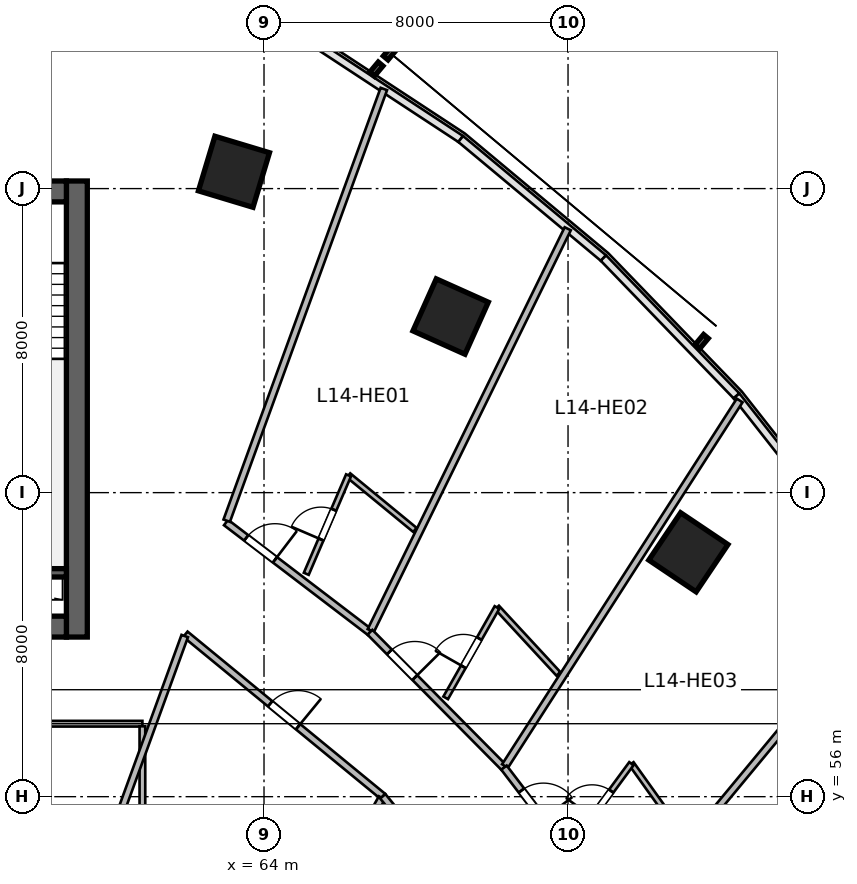
"""IFC4 building model, lengths in metres.
Left out: names, types, materials, properties, quantities, classifications, styles, units other than length and angle.
Written with IfcOpenShell. Run it as: python <this file> out.ifc"""

import sys

from ifc_helpers import new_model, si_unit, direction, frame, frame_2d, origin, origin_2d, place, context, subcontext, project, spatial, rectangle, extrude, source, transform, mapped, element, fill, save


model = new_model("IFC4")
c1 = context("Model", 3, precision=1e-05, world=origin(), true_north=direction((0.0, 1.0)))
c2 = subcontext(c1, "Body", "Model", "MODEL_VIEW")
j1 = project(units=[si_unit("LENGTHUNIT", "METRE"), si_unit("PLANEANGLEUNIT", "RADIAN")], contexts=[c1])
p1 = place(None, origin())
s1 = spatial("IfcSite", under=j1, at=p1, CompositionType="ELEMENT")
p2 = place(p1, origin())
s2 = spatial("IfcBuilding", under=s1, at=p2, CompositionType="ELEMENT")
p3 = place(p2, frame((0.0, 0.0, 64.2)))
s3 = spatial("IfcBuildingStorey", under=s2, at=p3, CompositionType="ELEMENT", Elevation=64.2)
m1 = source(origin(), c2, "Body", "SweptSolid", [
    extrude(rectangle(XDim=12.0, YDim=0.55, at=frame_2d((6.0, 0.0))), origin(), (0.0, 0.0, 1.0), 3.6),
])
p4 = place(p3, frame((59.075, 60.2, 0.0), z_axis=(0.0, 0.0, 1.0), x_axis=(0.0, 1.0, 0.0)))
e1 = element("IfcWall", 1, at=p4, inside=s3, PredefinedType="SHEAR", context=c2, shape_type="MappedRepresentation", body=[
    mapped(m1, transform((0.0, 0.0, 0.0), scale=1.0)),
])
m2 = source(origin(), c2, "Body", "SweptSolid", [
    extrude(rectangle(XDim=21.6, YDim=0.55, at=frame_2d((10.8, 0.0))), origin(), (0.0, 0.0, 1.0), 3.6),
])
p5 = place(p3, frame((37.2, 60.475, 0.0), z_axis=(0.0, 0.0, 1.0), x_axis=(1.0, 0.0, 0.0)))
e2 = element("IfcWall", 2, at=p5, inside=s3, PredefinedType="SHEAR", context=c2, shape_type="MappedRepresentation", body=[
    mapped(m2, transform((0.0, 0.0, 0.0), scale=1.0)),
])
p6 = place(p5, frame((1.1, 0.0, 0.0)))
e3 = element("IfcOpeningElement", 3, at=p6, cuts=e2, PredefinedType="OPENING", context=c2, shape_type="SweptSolid", body=[
    extrude(rectangle(XDim=1.15, YDim=2.15, at=frame_2d((0.575, 1.075))), frame((0.0, 0.285, 0.0), z_axis=(0.0, -1.0, 0.0), x_axis=(1.0, 0.0, 0.0)), (0.0, 0.0, 1.0), 0.57),
])
p7 = place(p5, frame((19.5, 0.0, 0.0)))
e4 = element("IfcOpeningElement", 4, at=p7, cuts=e2, PredefinedType="OPENING", context=c2, shape_type="SweptSolid", body=[
    extrude(rectangle(XDim=0.9, YDim=2.1, at=frame_2d((0.45, 1.05))), frame((0.0, 0.285, 0.0), z_axis=(0.0, -1.0, 0.0), x_axis=(1.0, 0.0, 0.0)), (0.0, 0.0, 1.0), 0.57),
])
p8 = place(p5, frame((12.02, 0.0, 0.0)))
e5 = element("IfcOpeningElement", 5, at=p8, cuts=e2, PredefinedType="OPENING", context=c2, shape_type="SweptSolid", body=[
    extrude(rectangle(XDim=1.6, YDim=2.15, at=frame_2d((0.8, 1.075))), frame((0.0, 0.285, 0.0), z_axis=(0.0, -1.0, 0.0), x_axis=(1.0, 0.0, 0.0)), (0.0, 0.0, 1.0), 0.57),
])
p9 = place(p3, frame((37.2, 71.925, 0.0), z_axis=(0.0, 0.0, 1.0), x_axis=(1.0, 0.0, 0.0)))
e6 = element("IfcWall", 6, at=p9, inside=s3, PredefinedType="SHEAR", context=c2, shape_type="MappedRepresentation", body=[
    mapped(m2, transform((0.0, 0.0, 0.0), scale=1.0)),
])
p10 = place(p9, frame((1.2, 0.0, 0.0)))
e7 = element("IfcOpeningElement", 7, at=p10, cuts=e6, PredefinedType="OPENING", context=c2, shape_type="SweptSolid", body=[
    extrude(rectangle(XDim=0.9, YDim=2.1, at=frame_2d((0.45, 1.05))), frame((0.0, 0.285, 0.0), z_axis=(0.0, -1.0, 0.0), x_axis=(1.0, 0.0, 0.0)), (0.0, 0.0, 1.0), 0.57),
])
p11 = place(p9, frame((14.7, 0.0, 0.0)))
e8 = element("IfcOpeningElement", 8, at=p11, cuts=e6, PredefinedType="OPENING", context=c2, shape_type="SweptSolid", body=[
    extrude(rectangle(XDim=1.2, YDim=2.15, at=frame_2d((0.6, 1.075))), frame((0.0, 0.285, 0.0), z_axis=(0.0, -1.0, 0.0), x_axis=(1.0, 0.0, 0.0)), (0.0, 0.0, 1.0), 0.57),
])
p12 = place(p9, frame((4.15, 0.0, 0.0)))
e9 = element("IfcOpeningElement", 9, at=p12, cuts=e6, PredefinedType="OPENING", context=c2, shape_type="SweptSolid", body=[
    extrude(rectangle(XDim=1.3, YDim=2.15, at=frame_2d((0.65, 1.075))), frame((0.0, 0.285, 0.0), z_axis=(0.0, -1.0, 0.0), x_axis=(1.0, 0.0, 0.0)), (0.0, 0.0, 1.0), 0.57),
])
p13 = place(p9, frame((7.1, 0.0, 0.0)))
e10 = element("IfcOpeningElement", 10, at=p13, cuts=e6, PredefinedType="OPENING", context=c2, shape_type="SweptSolid", body=[
    extrude(rectangle(XDim=0.9, YDim=2.1, at=frame_2d((0.45, 1.05))), frame((0.0, 0.285, 0.0), z_axis=(0.0, -1.0, 0.0), x_axis=(1.0, 0.0, 0.0)), (0.0, 0.0, 1.0), 0.57),
])
m3 = source(origin(), c2, "Body", "SweptSolid", [
    extrude(rectangle(XDim=3.27, YDim=0.22, at=frame_2d((1.635, 0.0))), origin(), (0.0, 0.0, 1.0), 3.6),
])
p14 = place(p3, frame((55.53, 61.89, 0.0), z_axis=(0.0, 0.0, 1.0), x_axis=(1.0, 0.0, 0.0)))
e11 = element("IfcWall", 11, at=p14, inside=s3, PredefinedType="SHEAR", context=c2, shape_type="MappedRepresentation", body=[
    mapped(m3, transform((0.0, 0.0, 0.0), scale=1.0)),
])
m4 = source(origin(), c2, "Body", "SweptSolid", [
    extrude(rectangle(XDim=1.5, YDim=1.5, at=origin_2d()), origin(), (0.0, 0.0, 1.0), 3.6),
])
for number, where, z_axis, x_axis in (
    (12, (63.209, 72.442, 0.0), (0.0, 0.0, 1.0), (0.289, 0.957, 0.0)),
    (13, (68.91, 68.633, 0.0), (0.0, 0.0, 1.0), (0.409, 0.912, 0.0)),
    (14, (75.167, 62.43, 0.0), (0.0, 0.0, 1.0), (0.558, 0.83, 0.0)),
):
    element("IfcColumn", number, at=place(p3, frame(where, z_axis=z_axis, x_axis=x_axis)), inside=s3, PredefinedType="COLUMN", context=c2, shape_type="MappedRepresentation", body=[
        mapped(m4, transform((0.0, 0.0, 0.0), scale=1.0)),
    ])
m5 = source(origin(), c2, "Body", "SweptSolid", [
    extrude(rectangle(XDim=6.6, YDim=0.15, at=frame_2d((3.3, 0.0))), origin(), (0.0, 0.0, 1.0), 3.36),
])
p15 = place(p3, frame((54.2, 57.92, 0.0), z_axis=(0.0, 0.0, 1.0), x_axis=(1.0, 0.0, 0.0)))
e15 = element("IfcWall", 15, at=p15, inside=s3, PredefinedType="PARTITIONING", context=c2, shape_type="MappedRepresentation", body=[
    mapped(m5, transform((0.0, 0.0, 0.0), scale=1.0)),
])
p16 = place(p15, frame((2.825, 0.0, 0.0)))
e16 = element("IfcOpeningElement", 16, at=p16, cuts=e15, PredefinedType="OPENING", context=c2, shape_type="SweptSolid", body=[
    extrude(rectangle(XDim=0.95, YDim=2.1, at=frame_2d((0.475, 1.05))), frame((0.0, 0.085, 0.0), z_axis=(0.0, -1.0, 0.0), x_axis=(1.0, 0.0, 0.0)), (0.0, 0.0, 1.0), 0.17),
])
m6 = source(origin(), c2, "Body", "SweptSolid", [
    extrude(rectangle(XDim=3.785, YDim=0.15, at=frame_2d((1.893, 0.0))), origin(), (0.0, 0.0, 1.0), 3.36),
])
p17 = place(p3, frame((60.8, 54.067, 0.0), z_axis=(0.0, 0.0, 1.0), x_axis=(0.0, 1.0, 0.0)))
e17 = element("IfcWall", 17, at=p17, inside=s3, PredefinedType="PARTITIONING", context=c2, shape_type="MappedRepresentation", body=[
    mapped(m6, transform((0.0, 0.0, 0.0), scale=1.0)),
])
m7 = source(origin(), c2, "Body", "SweptSolid", [
    extrude(rectangle(XDim=4.762, YDim=0.18, at=frame_2d((2.381, 0.0))), origin(), (0.0, 0.0, 1.0), 3.36),
])
p18 = place(p3, frame((63.001, 63.214, 0.0), z_axis=(0.0, 0.0, 1.0), x_axis=(0.795070295872, -0.60651729128, 0.0)))
e18 = element("IfcWall", 18, at=p18, inside=s3, PredefinedType="PLUMBINGWALL", context=c2, shape_type="MappedRepresentation", body=[
    mapped(m7, transform((0.0, 0.0, 0.0), scale=1.0)),
])
p19 = place(p18, frame((0.668, 0.0, 0.0)))
e19 = element("IfcOpeningElement", 19, at=p19, cuts=e18, PredefinedType="OPENING", context=c2, shape_type="SweptSolid", body=[
    extrude(rectangle(XDim=0.95, YDim=2.15, at=frame_2d((0.475, 1.075))), frame((0.0, 0.1, 0.0), z_axis=(0.0, -1.0, 0.0), x_axis=(1.0, 0.0, 0.0)), (0.0, 0.0, 1.0), 0.2),
])
m8 = source(origin(), c2, "Body", "SweptSolid", [
    extrude(rectangle(XDim=12.088, YDim=0.18, at=frame_2d((6.044, 0.0))), origin(), (0.0, 0.0, 1.0), 3.36),
])
p20 = place(p3, frame((63.019, 63.262, 0.0), z_axis=(0.0, 0.0, 1.0), x_axis=(0.34203007529, 0.939689005787, 0.0)))
e20 = element("IfcWall", 20, at=p20, inside=s3, PredefinedType="PLUMBINGWALL", context=c2, shape_type="MappedRepresentation", body=[
    mapped(m8, transform((0.0, 0.0, 0.0), scale=1.0)),
])
m9 = source(origin(), c2, "Body", "SweptSolid", [
    extrude(rectangle(XDim=11.775, YDim=0.18, at=frame_2d((5.887, 0.0))), origin(), (0.0, 0.0, 1.0), 3.36),
])
p21 = place(p3, frame((66.81, 60.371, 0.0), z_axis=(0.0, 0.0, 1.0), x_axis=(0.4401500056, 0.897924257702, 0.0)))
e21 = element("IfcWall", 21, at=p21, inside=s3, PredefinedType="PLUMBINGWALL", context=c2, shape_type="MappedRepresentation", body=[
    mapped(m9, transform((0.0, 0.0, 0.0), scale=1.0)),
])
m10 = source(origin(), c2, "Body", "SweptSolid", [
    extrude(rectangle(XDim=2.26, YDim=0.14, at=frame_2d((1.13, 0.0))), origin(), (0.0, 0.0, 1.0), 3.36),
])
p22 = place(p3, frame((66.224, 64.455, 0.0), z_axis=(0.0, 0.0, 1.0), x_axis=(0.772646789219, -0.634836151388, 0.0)))
e22 = element("IfcWall", 22, at=p22, inside=s3, PredefinedType="PARTITIONING", context=c2, shape_type="MappedRepresentation", body=[
    mapped(m10, transform((0.0, 0.0, 0.0), scale=1.0)),
])
m11 = source(origin(), c2, "Body", "SweptSolid", [
    extrude(rectangle(XDim=2.819, YDim=0.14, at=frame_2d((1.409, 0.0))), origin(), (0.0, 0.0, 1.0), 3.36),
])
p23 = place(p3, frame((65.112, 61.864, 0.0), z_axis=(0.0, 0.0, 1.0), x_axis=(0.394420979357, 0.918929861874, 0.0)))
e23 = element("IfcWall", 23, at=p23, inside=s3, PredefinedType="PARTITIONING", context=c2, shape_type="MappedRepresentation", body=[
    mapped(m11, transform((0.0, 0.0, 0.0), scale=1.0)),
])
p24 = place(p23, frame((0.984, 0.0, 0.0)))
e24 = element("IfcOpeningElement", 24, at=p24, cuts=e23, PredefinedType="OPENING", context=c2, shape_type="SweptSolid", body=[
    extrude(rectangle(XDim=0.85, YDim=2.05, at=frame_2d((0.425, 1.025))), frame((0.0, 0.08, 0.0), z_axis=(0.0, -1.0, 0.0), x_axis=(1.0, 0.0, 0.0)), (0.0, 0.0, 1.0), 0.16),
])
m12 = source(origin(), c2, "Body", "SweptSolid", [
    extrude(rectangle(XDim=5.012, YDim=0.18, at=frame_2d((2.506, 0.0))), origin(), (0.0, 0.0, 1.0), 3.36),
])
p25 = place(p3, frame((66.788, 60.326, 0.0), z_axis=(0.0, 0.0, 1.0), x_axis=(0.703664626435, -0.710532260707, 0.0)))
e25 = element("IfcWall", 25, at=p25, inside=s3, PredefinedType="PLUMBINGWALL", context=c2, shape_type="MappedRepresentation", body=[
    mapped(m12, transform((0.0, 0.0, 0.0), scale=1.0)),
])
p26 = place(p25, frame((0.728, 0.0, 0.0)))
e26 = element("IfcOpeningElement", 26, at=p26, cuts=e25, PredefinedType="OPENING", context=c2, shape_type="SweptSolid", body=[
    extrude(rectangle(XDim=0.95, YDim=2.15, at=frame_2d((0.475, 1.075))), frame((0.0, 0.1, 0.0), z_axis=(0.0, -1.0, 0.0), x_axis=(1.0, 0.0, 0.0)), (0.0, 0.0, 1.0), 0.2),
])
m13 = source(origin(), c2, "Body", "SweptSolid", [
    extrude(rectangle(XDim=11.432, YDim=0.18, at=frame_2d((5.716, 0.0))), origin(), (0.0, 0.0, 1.0), 3.36),
])
p27 = place(p3, frame((70.341, 56.805, 0.0), z_axis=(0.0, 0.0, 1.0), x_axis=(0.540196183124, 0.841539115988, 0.0)))
e27 = element("IfcWall", 27, at=p27, inside=s3, PredefinedType="PLUMBINGWALL", context=c2, shape_type="MappedRepresentation", body=[
    mapped(m13, transform((0.0, 0.0, 0.0), scale=1.0)),
])
m14 = source(origin(), c2, "Body", "SweptSolid", [
    extrude(rectangle(XDim=2.38, YDim=0.14, at=frame_2d((1.19, 0.0))), origin(), (0.0, 0.0, 1.0), 3.36),
])
p28 = place(p3, frame((70.131, 60.979, 0.0), z_axis=(0.0, 0.0, 1.0), x_axis=(0.679084816758, -0.734059814762, 0.0)))
e28 = element("IfcWall", 28, at=p28, inside=s3, PredefinedType="PARTITIONING", context=c2, shape_type="MappedRepresentation", body=[
    mapped(m14, transform((0.0, 0.0, 0.0), scale=1.0)),
])
m15 = source(origin(), c2, "Body", "SweptSolid", [
    extrude(rectangle(XDim=2.735, YDim=0.14, at=frame_2d((1.367, 0.0))), origin(), (0.0, 0.0, 1.0), 3.36),
])
p29 = place(p3, frame((68.781, 58.6, 0.0), z_axis=(0.0, 0.0, 1.0), x_axis=(0.493694940578, 0.869635156631, 0.0)))
e29 = element("IfcWall", 29, at=p29, inside=s3, PredefinedType="PARTITIONING", context=c2, shape_type="MappedRepresentation", body=[
    mapped(m15, transform((0.0, 0.0, 0.0), scale=1.0)),
])
p30 = place(p29, frame((0.942, 0.0, 0.0)))
e30 = element("IfcOpeningElement", 30, at=p30, cuts=e29, PredefinedType="OPENING", context=c2, shape_type="SweptSolid", body=[
    extrude(rectangle(XDim=0.85, YDim=2.05, at=frame_2d((0.425, 1.025))), frame((0.0, 0.08, 0.0), z_axis=(0.0, -1.0, 0.0), x_axis=(1.0, 0.0, 0.0)), (0.0, 0.0, 1.0), 0.16),
])
m16 = source(origin(), c2, "Body", "SweptSolid", [
    extrude(rectangle(XDim=5.135, YDim=0.18, at=frame_2d((2.567, 0.0))), origin(), (0.0, 0.0, 1.0), 3.36),
])
p31 = place(p3, frame((70.315, 56.764, 0.0), z_axis=(0.0, 0.0, 1.0), x_axis=(0.606802199649, -0.794852873494, 0.0)))
e31 = element("IfcWall", 31, at=p31, inside=s3, PredefinedType="PLUMBINGWALL", context=c2, shape_type="MappedRepresentation", body=[
    mapped(m16, transform((0.0, 0.0, 0.0), scale=1.0)),
])
p32 = place(p31, frame((0.757, 0.0, 0.0)))
e32 = element("IfcOpeningElement", 32, at=p32, cuts=e31, PredefinedType="OPENING", context=c2, shape_type="SweptSolid", body=[
    extrude(rectangle(XDim=0.95, YDim=2.15, at=frame_2d((0.475, 1.075))), frame((0.0, 0.1, 0.0), z_axis=(0.0, -1.0, 0.0), x_axis=(1.0, 0.0, 0.0)), (0.0, 0.0, 1.0), 0.2),
])
m17 = source(origin(), c2, "Body", "SweptSolid", [
    extrude(rectangle(XDim=10.975, YDim=0.18, at=frame_2d((5.487, 0.0))), origin(), (0.0, 0.0, 1.0), 3.36),
])
p33 = place(p3, frame((73.46, 52.719, 0.0), z_axis=(0.0, 0.0, 1.0), x_axis=(0.638125265812, 0.769932558821, 0.0)))
e33 = element("IfcWall", 33, at=p33, inside=s3, PredefinedType="PLUMBINGWALL", context=c2, shape_type="MappedRepresentation", body=[
    mapped(m17, transform((0.0, 0.0, 0.0), scale=1.0)),
])
m18 = source(origin(), c2, "Body", "SweptSolid", [
    extrude(rectangle(XDim=2.437, YDim=0.14, at=frame_2d((1.218, 0.0))), origin(), (0.0, 0.0, 1.0), 3.36),
])
p34 = place(p3, frame((73.667, 56.868, 0.0), z_axis=(0.0, 0.0, 1.0), x_axis=(0.581797219134, -0.813333877204, 0.0)))
e34 = element("IfcWall", 34, at=p34, inside=s3, PredefinedType="PARTITIONING", context=c2, shape_type="MappedRepresentation", body=[
    mapped(m18, transform((0.0, 0.0, 0.0), scale=1.0)),
])
m19 = source(origin(), c2, "Body", "SweptSolid", [
    extrude(rectangle(XDim=2.642, YDim=0.14, at=frame_2d((1.321, 0.0))), origin(), (0.0, 0.0, 1.0), 3.36),
])
p35 = place(p3, frame((72.101, 54.741, 0.0), z_axis=(0.0, 0.0, 1.0), x_axis=(0.592789122423, 0.805357719487, 0.0)))
e35 = element("IfcWall", 35, at=p35, inside=s3, PredefinedType="PARTITIONING", context=c2, shape_type="MappedRepresentation", body=[
    mapped(m19, transform((0.0, 0.0, 0.0), scale=1.0)),
])
p36 = place(p35, frame((0.896, 0.0, 0.0)))
e36 = element("IfcOpeningElement", 36, at=p36, cuts=e35, PredefinedType="OPENING", context=c2, shape_type="SweptSolid", body=[
    extrude(rectangle(XDim=0.85, YDim=2.05, at=frame_2d((0.425, 1.025))), frame((0.0, 0.08, 0.0), z_axis=(0.0, -1.0, 0.0), x_axis=(1.0, 0.0, 0.0)), (0.0, 0.0, 1.0), 0.16),
])
m20 = source(origin(), c2, "Body", "SweptSolid", [
    extrude(rectangle(XDim=6.721, YDim=0.18, at=frame_2d((3.361, 0.0))), origin(), (0.0, 0.0, 1.0), 3.36),
])
p37 = place(p3, frame((61.931, 60.275, 0.0), z_axis=(0.0, 0.0, 1.0), x_axis=(0.772828051199, -0.63461547671, 0.0)))
e37 = element("IfcWall", 37, at=p37, inside=s3, PredefinedType="PLUMBINGWALL", context=c2, shape_type="MappedRepresentation", body=[
    mapped(m20, transform((0.0, 0.0, 0.0), scale=1.0)),
])
p38 = place(p37, frame((2.885, 0.0, 0.0)))
e38 = element("IfcOpeningElement", 38, at=p38, cuts=e37, PredefinedType="OPENING", context=c2, shape_type="SweptSolid", body=[
    extrude(rectangle(XDim=0.95, YDim=2.15, at=frame_2d((0.475, 1.075))), frame((0.0, 0.1, 0.0), z_axis=(0.0, -1.0, 0.0), x_axis=(1.0, 0.0, 0.0)), (0.0, 0.0, 1.0), 0.2),
])
m21 = source(origin(), c2, "Body", "SweptSolid", [
    extrude(rectangle(XDim=12.196, YDim=0.18, at=frame_2d((6.098, 0.0))), origin(), (0.0, 0.0, 1.0), 3.36),
])
p39 = place(p3, frame((57.742, 48.766, 0.0), z_axis=(0.0, 0.0, 1.0), x_axis=(0.342022711534, 0.939691686031, 0.0)))
e39 = element("IfcWall", 39, at=p39, inside=s3, PredefinedType="PLUMBINGWALL", context=c2, shape_type="MappedRepresentation", body=[
    mapped(m21, transform((0.0, 0.0, 0.0), scale=1.0)),
])
m22 = source(origin(), c2, "Body", "SweptSolid", [
    extrude(rectangle(XDim=11.67, YDim=0.18, at=frame_2d((5.835, 0.0))), origin(), (0.0, 0.0, 1.0), 3.36),
])
p40 = place(p3, frame((61.381, 45.795, 0.0), z_axis=(0.0, 0.0, 1.0), x_axis=(0.490156946222, 0.871634193954, 0.0)))
e40 = element("IfcWall", 40, at=p40, inside=s3, PredefinedType="PLUMBINGWALL", context=c2, shape_type="MappedRepresentation", body=[
    mapped(m22, transform((0.0, 0.0, 0.0), scale=1.0)),
])
m23 = source(origin(), c2, "Body", "SweptSolid", [
    extrude(rectangle(XDim=7.113, YDim=0.18, at=frame_2d((3.556, 0.0))), origin(), (0.0, 0.0, 1.0), 3.36),
])
p41 = place(p3, frame((67.126, 56.01, 0.0), z_axis=(0.0, 0.0, 1.0), x_axis=(0.63149032532, -0.775383755974, 0.0)))
e41 = element("IfcWall", 41, at=p41, inside=s3, PredefinedType="PLUMBINGWALL", context=c2, shape_type="MappedRepresentation", body=[
    mapped(m23, transform((0.0, 0.0, 0.0), scale=1.0)),
])
p42 = place(p41, frame((3.081, 0.0, 0.0)))
e42 = element("IfcOpeningElement", 42, at=p42, cuts=e41, PredefinedType="OPENING", context=c2, shape_type="SweptSolid", body=[
    extrude(rectangle(XDim=0.95, YDim=2.15, at=frame_2d((0.475, 1.075))), frame((0.0, 0.1, 0.0), z_axis=(0.0, -1.0, 0.0), x_axis=(1.0, 0.0, 0.0)), (0.0, 0.0, 1.0), 0.2),
])
m24 = source(origin(), c2, "Body", "SweptSolid", [
    extrude(rectangle(XDim=0.95, YDim=2.15, at=frame_2d((0.475, 1.075))), frame((0.0, 0.025, 0.0), z_axis=(0.0, -1.0, 0.0), x_axis=(1.0, 0.0, 0.0)), (0.0, 0.0, 1.0), 0.05),
])
p43 = place(p19, origin())
e43 = element("IfcDoor", 43, at=p43, inside=s3, OperationType="SINGLE_SWING_RIGHT", PredefinedType="DOOR", context=c2, shape_type="MappedRepresentation", body=[
    mapped(m24, transform((0.0, 0.0, 0.0), scale=1.0)),
])
fill(e19, e43)
m25 = source(origin(), c2, "Body", "SweptSolid", [
    extrude(rectangle(XDim=0.85, YDim=2.05, at=frame_2d((0.425, 1.025))), frame((0.0, 0.025, 0.0), z_axis=(0.0, -1.0, 0.0), x_axis=(1.0, 0.0, 0.0)), (0.0, 0.0, 1.0), 0.05),
])
p44 = place(p24, origin())
e44 = element("IfcDoor", 44, at=p44, inside=s3, OperationType="SINGLE_SWING_LEFT", PredefinedType="DOOR", context=c2, shape_type="MappedRepresentation", body=[
    mapped(m25, transform((0.0, 0.0, 0.0), scale=1.0)),
])
fill(e24, e44)
p45 = place(p26, origin())
e45 = element("IfcDoor", 45, at=p45, inside=s3, OperationType="SINGLE_SWING_RIGHT", PredefinedType="DOOR", context=c2, shape_type="MappedRepresentation", body=[
    mapped(m24, transform((0.0, 0.0, 0.0), scale=1.0)),
])
fill(e26, e45)
p46 = place(p30, origin())
e46 = element("IfcDoor", 46, at=p46, inside=s3, OperationType="SINGLE_SWING_LEFT", PredefinedType="DOOR", context=c2, shape_type="MappedRepresentation", body=[
    mapped(m25, transform((0.0, 0.0, 0.0), scale=1.0)),
])
fill(e30, e46)
p47 = place(p32, origin())
e47 = element("IfcDoor", 47, at=p47, inside=s3, OperationType="SINGLE_SWING_RIGHT", PredefinedType="DOOR", context=c2, shape_type="MappedRepresentation", body=[
    mapped(m24, transform((0.0, 0.0, 0.0), scale=1.0)),
])
fill(e32, e47)
p48 = place(p36, origin())
e48 = element("IfcDoor", 48, at=p48, inside=s3, OperationType="SINGLE_SWING_LEFT", PredefinedType="DOOR", context=c2, shape_type="MappedRepresentation", body=[
    mapped(m25, transform((0.0, 0.0, 0.0), scale=1.0)),
])
fill(e36, e48)
p49 = place(p38, origin())
e49 = element("IfcDoor", 49, at=p49, inside=s3, OperationType="SINGLE_SWING_RIGHT", PredefinedType="DOOR", context=c2, shape_type="MappedRepresentation", body=[
    mapped(m24, transform((0.0, 0.0, 0.0), scale=1.0)),
])
fill(e38, e49)
save(model, sys.argv[1])
